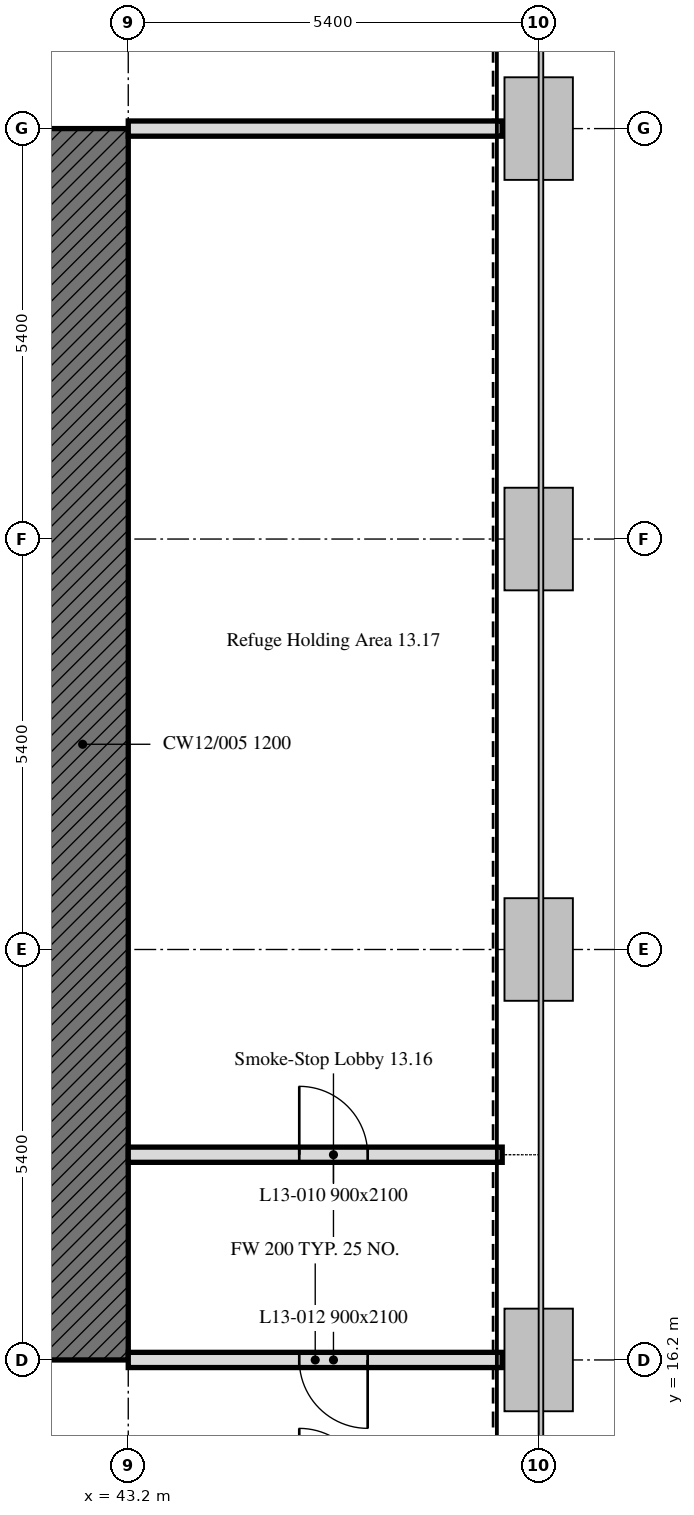
"""IFC4 building model, lengths in metres.
Left out: names, types, materials, properties, quantities, classifications, styles, units other than length and angle.
Written with IfcOpenShell. Run it as: python <this file> out.ifc"""

import sys

from ifc_helpers import new_model, si_unit, direction, frame, frame_2d, origin, place, context, subcontext, project, spatial, rectangle, extrude, element, fill, save


model = new_model("IFC4")
c1 = context("Model", 3, precision=1e-05, world=origin(), true_north=direction((0.0, 1.0)))
c2 = subcontext(c1, "Body", "Model", "MODEL_VIEW")
j1 = project(units=[si_unit("LENGTHUNIT", "METRE"), si_unit("PLANEANGLEUNIT", "RADIAN")], contexts=[c1])
p1 = place(None, origin())
s1 = spatial("IfcSite", under=j1, at=p1, CompositionType="ELEMENT")
p2 = place(p1, origin())
s2 = spatial("IfcBuilding", under=s1, at=p2, CompositionType="ELEMENT")
p3 = place(p2, frame((0.0, 0.0, 60.2)))
s3 = spatial("IfcBuildingStorey", under=s2, at=p3, CompositionType="ELEMENT", Elevation=60.2)
p4 = place(p3, frame((42.6, 32.4, 0.0), z_axis=(0.0, 0.0, 1.0), x_axis=(0.0, -1.0, 0.0)))
e1 = element("IfcWall", 1, at=p4, inside=s3, PredefinedType="SOLIDWALL", context=c2, shape_type="SweptSolid", body=[
    extrude(rectangle(XDim=16.2, YDim=1.2, at=frame_2d((8.1, 0.0))), origin(), (0.0, 0.0, 1.0), 4.5),
])
p5 = place(p3, frame((48.12, 16.2, 0.0), z_axis=(0.0, 0.0, 1.0), x_axis=(-1.0, 0.0, 0.0)))
e2 = element("IfcWall", 2, at=p5, inside=s3, PredefinedType="PARTITIONING", context=c2, shape_type="SweptSolid", body=[
    extrude(rectangle(XDim=4.92, YDim=0.2, at=frame_2d((2.46, 0.0))), origin(), (0.0, 0.0, 1.0), 3.75),
])
p6 = place(p5, frame((1.77, 0.0, 0.0)))
e3 = element("IfcOpeningElement", 3, at=p6, cuts=e2, PredefinedType="OPENING", context=c2, shape_type="SweptSolid", body=[
    extrude(rectangle(XDim=0.9, YDim=2.1, at=frame_2d((0.45, 1.05))), frame((0.0, 0.1, 0.0), z_axis=(0.0, -1.0, 0.0), x_axis=(1.0, 0.0, 0.0)), (0.0, 0.0, 1.0), 0.2),
])
p7 = place(p3, frame((43.2, 32.4, 0.0), z_axis=(0.0, 0.0, 1.0), x_axis=(1.0, 0.0, 0.0)))
e4 = element("IfcWall", 4, at=p7, inside=s3, PredefinedType="PARTITIONING", context=c2, shape_type="SweptSolid", body=[
    extrude(rectangle(XDim=4.92, YDim=0.2, at=frame_2d((2.46, 0.0))), origin(), (0.0, 0.0, 1.0), 3.75),
])
p8 = place(p3, frame((43.2, 18.9, 0.0), z_axis=(0.0, 0.0, 1.0), x_axis=(1.0, 0.0, 0.0)))
e5 = element("IfcWall", 5, at=p8, inside=s3, PredefinedType="PARTITIONING", context=c2, shape_type="SweptSolid", body=[
    extrude(rectangle(XDim=4.92, YDim=0.2, at=frame_2d((2.46, 0.0))), origin(), (0.0, 0.0, 1.0), 4.5),
])
p9 = place(p8, frame((2.25, 0.0, 0.0)))
e6 = element("IfcOpeningElement", 6, at=p9, cuts=e5, PredefinedType="OPENING", context=c2, shape_type="SweptSolid", body=[
    extrude(rectangle(XDim=0.9, YDim=2.1, at=frame_2d((0.45, 1.05))), frame((0.0, 0.1, 0.0), z_axis=(0.0, -1.0, 0.0), x_axis=(1.0, 0.0, 0.0)), (0.0, 0.0, 1.0), 0.2),
])
p10 = place(p9, origin())
e7 = element("IfcDoor", 7, at=p10, inside=s3, OperationType="SINGLE_SWING_RIGHT", PredefinedType="DOOR", context=c2, shape_type="SweptSolid", body=[
    extrude(rectangle(XDim=0.9, YDim=2.1, at=frame_2d((0.45, 1.05))), frame((0.0, 0.025, 0.0), z_axis=(0.0, -1.0, 0.0), x_axis=(1.0, 0.0, 0.0)), (0.0, 0.0, 1.0), 0.05),
])
fill(e6, e7)
p11 = place(p6, origin())
e8 = element("IfcDoor", 8, at=p11, inside=s3, OperationType="SINGLE_SWING_LEFT", PredefinedType="DOOR", context=c2, shape_type="SweptSolid", body=[
    extrude(rectangle(XDim=0.9, YDim=2.1, at=frame_2d((0.45, 1.05))), frame((0.0, 0.025, 0.0), z_axis=(0.0, -1.0, 0.0), x_axis=(1.0, 0.0, 0.0)), (0.0, 0.0, 1.0), 0.05),
])
fill(e3, e8)
save(model, sys.argv[1])
